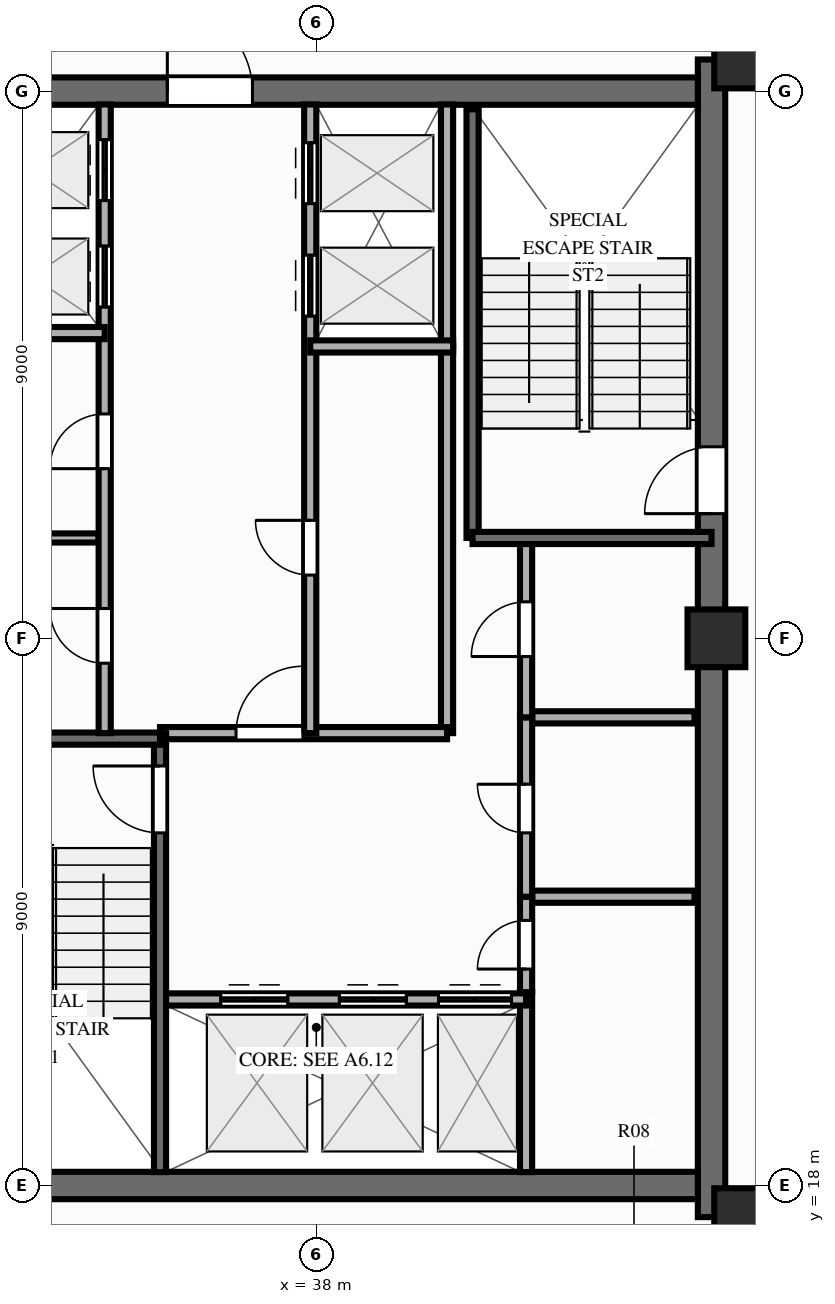
"""IFC4 building model, lengths in metres.
Left out: names, types, materials, properties, quantities, classifications, styles, units other than length and angle.
Written with IfcOpenShell. Run it as: python <this file> out.ifc"""

import sys

from ifc_helpers import new_model, si_unit, direction, frame, frame_2d, origin, origin_2d, place, context, subcontext, project, spatial, rectangle, extrude, source, transform, mapped, element, fill, save


model = new_model("IFC4")
c1 = context("Model", 3, precision=1e-05, world=origin(), true_north=direction((0.0, 1.0)))
c2 = subcontext(c1, "Body", "Model", "MODEL_VIEW")
j1 = project(units=[si_unit("LENGTHUNIT", "METRE"), si_unit("PLANEANGLEUNIT", "RADIAN")], contexts=[c1])
p1 = place(None, origin())
s1 = spatial("IfcSite", under=j1, at=p1, CompositionType="ELEMENT")
p2 = place(p1, origin())
s2 = spatial("IfcBuilding", under=s1, at=p2, CompositionType="ELEMENT")
p3 = place(p2, frame((0.0, 0.0, 236.1)))
s3 = spatial("IfcBuildingStorey", under=s2, at=p3, CompositionType="ELEMENT", Elevation=236.1)
p4 = place(p3, frame((44.5, 17.48, 0.0), z_axis=(0.0, 0.0, 1.0), x_axis=(0.0, 1.0, 0.0)))
e1 = element("IfcWall", 1, at=p4, inside=s3, PredefinedType="SHEAR", context=c2, shape_type="SweptSolid", body=[
    extrude(rectangle(XDim=19.04, YDim=0.45, at=frame_2d((9.52, 0.0))), origin(), (0.0, 0.0, 1.0), 3.9),
])
p5 = place(p4, frame((12.67, 0.0, 0.0), z_axis=(0.0, 0.0, 1.0), x_axis=(-1.0, 0.0, 0.0)))
e2 = element("IfcOpeningElement", 2, at=p5, cuts=e1, PredefinedType="OPENING", context=c2, shape_type="SweptSolid", body=[
    extrude(rectangle(XDim=1.1, YDim=2.15, at=frame_2d((0.55, 1.075))), frame((0.0, 0.237, 0.0), z_axis=(0.0, -1.0, 0.0), x_axis=(1.0, 0.0, 0.0)), (0.0, 0.0, 1.0), 0.474),
])
p6 = place(p3, frame((31.725, 18.0, 0.0), z_axis=(0.0, 0.0, 1.0), x_axis=(1.0, 0.0, 0.0)))
e3 = element("IfcWall", 3, at=p6, inside=s3, PredefinedType="SHEAR", context=c2, shape_type="SweptSolid", body=[
    extrude(rectangle(XDim=12.55, YDim=0.45, at=frame_2d((6.275, 0.0))), origin(), (0.0, 0.0, 1.0), 3.9),
])
p7 = place(p3, frame((31.725, 36.0, 0.0), z_axis=(0.0, 0.0, 1.0), x_axis=(1.0, 0.0, 0.0)))
e4 = element("IfcWall", 4, at=p7, inside=s3, PredefinedType="SHEAR", context=c2, shape_type="SweptSolid", body=[
    extrude(rectangle(XDim=12.55, YDim=0.45, at=frame_2d((6.275, 0.0))), origin(), (0.0, 0.0, 1.0), 3.9),
])
p8 = place(p7, frame((5.225, 0.0, 0.0), z_axis=(0.0, 0.0, 1.0), x_axis=(-1.0, 0.0, 0.0)))
e5 = element("IfcOpeningElement", 5, at=p8, cuts=e4, PredefinedType="OPENING", context=c2, shape_type="SweptSolid", body=[
    extrude(rectangle(XDim=1.4, YDim=2.15, at=frame_2d((0.7, 1.075))), frame((0.0, 0.237, 0.0), z_axis=(0.0, -1.0, 0.0), x_axis=(1.0, 0.0, 0.0)), (0.0, 0.0, 1.0), 0.474),
])
m1 = source(origin(), c2, "Body", "SweptSolid", [
    extrude(rectangle(XDim=0.95, YDim=0.95, at=origin_2d()), origin(), (0.0, 0.0, 1.0), 3.9),
])
for number, where, z_axis, x_axis in (
    (6, (45.02, 17.48, 0.0), (0.0, 0.0, 1.0), (1.0, 0.0, 0.0)),
    (7, (45.02, 36.52, 0.0), (0.0, 0.0, 1.0), (1.0, 0.0, 0.0)),
    (8, (44.58, 27.0, 0.0), (0.0, 0.0, 1.0), (1.0, 0.0, 0.0)),
):
    element("IfcColumn", number, at=place(p3, frame(where, z_axis=z_axis, x_axis=x_axis)), inside=s3, PredefinedType="COLUMN", context=c2, shape_type="MappedRepresentation", body=[
        mapped(m1, transform((0.0, 0.0, 0.0), scale=1.0)),
    ])
p9 = place(p3, frame((32.15, 28.65, 0.0), z_axis=(0.0, 0.0, 1.0), x_axis=(1.0, 0.0, 0.0)))
e9 = element("IfcWall", 9, at=p9, inside=s3, PredefinedType="PARTITIONING", context=c2, shape_type="SweptSolid", body=[
    extrude(rectangle(XDim=2.27, YDim=0.15, at=frame_2d((1.135, 0.0))), origin(), (0.0, 0.0, 1.0), 3.04),
])
p10 = place(p3, frame((41.55, 22.75, 0.0), z_axis=(0.0, 0.0, 1.0), x_axis=(1.0, 0.0, 0.0)))
e10 = element("IfcWall", 10, at=p10, inside=s3, PredefinedType="PARTITIONING", context=c2, shape_type="SweptSolid", body=[
    extrude(rectangle(XDim=2.67, YDim=0.2, at=frame_2d((1.335, 0.0))), origin(), (0.0, 0.0, 1.0), 3.56),
])
p11 = place(p3, frame((41.55, 25.7, 0.0), z_axis=(0.0, 0.0, 1.0), x_axis=(1.0, 0.0, 0.0)))
e11 = element("IfcWall", 11, at=p11, inside=s3, PredefinedType="PARTITIONING", context=c2, shape_type="SweptSolid", body=[
    extrude(rectangle(XDim=2.67, YDim=0.2, at=frame_2d((1.335, 0.0))), origin(), (0.0, 0.0, 1.0), 3.04),
])
p12 = place(p3, frame((41.45, 18.22, 0.0), z_axis=(0.0, 0.0, 1.0), x_axis=(0.0, 1.0, 0.0)))
e12 = element("IfcWall", 12, at=p12, inside=s3, PredefinedType="PARTITIONING", context=c2, shape_type="SweptSolid", body=[
    extrude(rectangle(XDim=2.96, YDim=0.2, at=frame_2d((1.48, 0.0))), origin(), (0.0, 0.0, 1.0), 3.56),
])
p13 = place(p3, frame((41.45, 21.18, 0.0), z_axis=(0.0, 0.0, 1.0), x_axis=(0.0, 1.0, 0.0)))
e13 = element("IfcWall", 13, at=p13, inside=s3, PredefinedType="PARTITIONING", context=c2, shape_type="SweptSolid", body=[
    extrude(rectangle(XDim=1.57, YDim=0.2, at=frame_2d((0.785, 0.0))), origin(), (0.0, 0.0, 1.0), 3.56),
])
p14 = place(p13, frame((0.38, 0.0, 0.0)))
e14 = element("IfcOpeningElement", 14, at=p14, cuts=e13, PredefinedType="OPENING", context=c2, shape_type="SweptSolid", body=[
    extrude(rectangle(XDim=0.8, YDim=2.05, at=frame_2d((0.4, 1.025))), frame((0.0, 0.112, 0.0), z_axis=(0.0, -1.0, 0.0), x_axis=(1.0, 0.0, 0.0)), (0.0, 0.0, 1.0), 0.224),
])
p15 = place(p3, frame((41.45, 22.75, 0.0), z_axis=(0.0, 0.0, 1.0), x_axis=(0.0, 1.0, 0.0)))
e15 = element("IfcWall", 15, at=p15, inside=s3, PredefinedType="PARTITIONING", context=c2, shape_type="SweptSolid", body=[
    extrude(rectangle(XDim=2.95, YDim=0.2, at=frame_2d((1.475, 0.0))), origin(), (0.0, 0.0, 1.0), 3.56),
])
p16 = place(p15, frame((1.05, 0.0, 0.0)))
e16 = element("IfcOpeningElement", 16, at=p16, cuts=e15, PredefinedType="OPENING", context=c2, shape_type="SweptSolid", body=[
    extrude(rectangle(XDim=0.8, YDim=2.05, at=frame_2d((0.4, 1.025))), frame((0.0, 0.112, 0.0), z_axis=(0.0, -1.0, 0.0), x_axis=(1.0, 0.0, 0.0)), (0.0, 0.0, 1.0), 0.224),
])
p17 = place(p3, frame((41.45, 25.7, 0.0), z_axis=(0.0, 0.0, 1.0), x_axis=(0.0, 1.0, 0.0)))
e17 = element("IfcWall", 17, at=p17, inside=s3, PredefinedType="PARTITIONING", context=c2, shape_type="SweptSolid", body=[
    extrude(rectangle(XDim=2.9, YDim=0.2, at=frame_2d((1.45, 0.0))), origin(), (0.0, 0.0, 1.0), 3.56),
])
p18 = place(p17, frame((1.0, 0.0, 0.0)))
e18 = element("IfcOpeningElement", 18, at=p18, cuts=e17, PredefinedType="OPENING", context=c2, shape_type="SweptSolid", body=[
    extrude(rectangle(XDim=0.9, YDim=2.1, at=frame_2d((0.45, 1.05))), frame((0.0, 0.112, 0.0), z_axis=(0.0, -1.0, 0.0), x_axis=(1.0, 0.0, 0.0)), (0.0, 0.0, 1.0), 0.224),
])
p19 = place(p3, frame((40.15, 25.44, 0.0), z_axis=(0.0, 0.0, 1.0), x_axis=(0.0, 1.0, 0.0)))
e19 = element("IfcWall", 19, at=p19, inside=s3, PredefinedType="PARTITIONING", context=c2, shape_type="SweptSolid", body=[
    extrude(rectangle(XDim=6.36, YDim=0.2, at=frame_2d((3.18, 0.0))), origin(), (0.0, 0.0, 1.0), 3.56),
])
p20 = place(p3, frame((40.15, 31.8, 0.0), z_axis=(0.0, 0.0, 1.0), x_axis=(0.0, 1.0, 0.0)))
e20 = element("IfcWall", 20, at=p20, inside=s3, PredefinedType="PARTITIONING", context=c2, shape_type="SweptSolid", body=[
    extrude(rectangle(XDim=3.98, YDim=0.2, at=frame_2d((1.99, 0.0))), origin(), (0.0, 0.0, 1.0), 3.56),
])
p21 = place(p3, frame((35.43, 21.06, 0.0), z_axis=(0.0, 0.0, 1.0), x_axis=(1.0, 0.0, 0.0)))
e21 = element("IfcWall", 21, at=p21, inside=s3, PredefinedType="PARTITIONING", context=c2, shape_type="SweptSolid", body=[
    extrude(rectangle(XDim=6.02, YDim=0.2, at=frame_2d((3.01, 0.0))), origin(), (0.0, 0.0, 1.0), 3.56),
])
p22 = place(p21, frame((1.0, 0.0, 0.0)))
e22 = element("IfcOpeningElement", 22, at=p22, cuts=e21, PredefinedType="OPENING", context=c2, shape_type="SweptSolid", body=[
    extrude(rectangle(XDim=1.1, YDim=2.15, at=frame_2d((0.55, 1.075))), frame((0.0, 0.112, 0.0), z_axis=(0.0, -1.0, 0.0), x_axis=(1.0, 0.0, 0.0)), (0.0, 0.0, 1.0), 0.224),
])
p23 = place(p21, frame((2.95, 0.0, 0.0)))
e23 = element("IfcOpeningElement", 23, at=p23, cuts=e21, PredefinedType="OPENING", context=c2, shape_type="SweptSolid", body=[
    extrude(rectangle(XDim=1.1, YDim=2.15, at=frame_2d((0.55, 1.075))), frame((0.0, 0.112, 0.0), z_axis=(0.0, -1.0, 0.0), x_axis=(1.0, 0.0, 0.0)), (0.0, 0.0, 1.0), 0.224),
])
p24 = place(p21, frame((4.58, 0.0, 0.0)))
e24 = element("IfcOpeningElement", 24, at=p24, cuts=e21, PredefinedType="OPENING", context=c2, shape_type="SweptSolid", body=[
    extrude(rectangle(XDim=1.2, YDim=2.15, at=frame_2d((0.6, 1.075))), frame((0.0, 0.112, 0.0), z_axis=(0.0, -1.0, 0.0), x_axis=(1.0, 0.0, 0.0)), (0.0, 0.0, 1.0), 0.224),
])
p25 = place(p3, frame((35.43, 25.44, 0.0), z_axis=(0.0, 0.0, 1.0), x_axis=(1.0, 0.0, 0.0)))
e25 = element("IfcWall", 25, at=p25, inside=s3, PredefinedType="PARTITIONING", context=c2, shape_type="SweptSolid", body=[
    extrude(rectangle(XDim=4.72, YDim=0.2, at=frame_2d((2.36, 0.0))), origin(), (0.0, 0.0, 1.0), 3.56),
])
p26 = place(p25, frame((1.25, 0.0, 0.0)))
e26 = element("IfcOpeningElement", 26, at=p26, cuts=e25, PredefinedType="OPENING", context=c2, shape_type="SweptSolid", body=[
    extrude(rectangle(XDim=1.1, YDim=2.15, at=frame_2d((0.55, 1.075))), frame((0.0, 0.112, 0.0), z_axis=(0.0, -1.0, 0.0), x_axis=(1.0, 0.0, 0.0)), (0.0, 0.0, 1.0), 0.224),
])
p27 = place(p3, frame((35.43, 18.22, 0.0), z_axis=(0.0, 0.0, 1.0), x_axis=(0.0, 1.0, 0.0)))
e27 = element("IfcWall", 27, at=p27, inside=s3, PredefinedType="SOLIDWALL", context=c2, shape_type="SweptSolid", body=[
    extrude(rectangle(XDim=7.22, YDim=0.2, at=frame_2d((3.61, 0.0))), origin(), (0.0, 0.0, 1.0), 3.69),
])
p28 = place(p27, frame((6.68, 0.0, 0.0), z_axis=(0.0, 0.0, 1.0), x_axis=(-1.0, 0.0, 0.0)))
e28 = element("IfcOpeningElement", 28, at=p28, cuts=e27, PredefinedType="OPENING", context=c2, shape_type="SweptSolid", body=[
    extrude(rectangle(XDim=1.1, YDim=2.15, at=frame_2d((0.55, 1.075))), frame((0.0, 0.112, 0.0), z_axis=(0.0, -1.0, 0.0), x_axis=(1.0, 0.0, 0.0)), (0.0, 0.0, 1.0), 0.224),
])
p29 = place(p3, frame((31.5, 25.35, 0.0), z_axis=(0.0, 0.0, 1.0), x_axis=(1.0, 0.0, 0.0)))
e29 = element("IfcWall", 29, at=p29, inside=s3, PredefinedType="SOLIDWALL", context=c2, shape_type="SweptSolid", body=[
    extrude(rectangle(XDim=3.93, YDim=0.2, at=frame_2d((1.965, 0.0))), origin(), (0.0, 0.0, 1.0), 3.69),
])
p30 = place(p3, frame((40.57, 28.65, 0.0), z_axis=(0.0, 0.0, 1.0), x_axis=(0.0, 1.0, 0.0)))
e30 = element("IfcWall", 30, at=p30, inside=s3, PredefinedType="SOLIDWALL", context=c2, shape_type="SweptSolid", body=[
    extrude(rectangle(XDim=7.05, YDim=0.2, at=frame_2d((3.525, 0.0))), origin(), (0.0, 0.0, 1.0), 3.69),
])
p31 = place(p3, frame((40.57, 28.65, 0.0), z_axis=(0.0, 0.0, 1.0), x_axis=(1.0, 0.0, 0.0)))
e31 = element("IfcWall", 31, at=p31, inside=s3, PredefinedType="SOLIDWALL", context=c2, shape_type="SweptSolid", body=[
    extrude(rectangle(XDim=3.93, YDim=0.2, at=frame_2d((1.965, 0.0))), origin(), (0.0, 0.0, 1.0), 3.69),
])
p32 = place(p3, frame((34.52, 25.44, 0.0), z_axis=(0.0, 0.0, 1.0), x_axis=(0.0, 1.0, 0.0)))
e32 = element("IfcWall", 32, at=p32, inside=s3, PredefinedType="PARTITIONING", context=c2, shape_type="SweptSolid", body=[
    extrude(rectangle(XDim=10.34, YDim=0.2, at=frame_2d((5.17, 0.0))), origin(), (0.0, 0.0, 1.0), 3.56),
])
p33 = place(p32, frame((1.15, 0.0, 0.0)))
e33 = element("IfcOpeningElement", 33, at=p33, cuts=e32, PredefinedType="OPENING", context=c2, shape_type="SweptSolid", body=[
    extrude(rectangle(XDim=0.9, YDim=2.1, at=frame_2d((0.45, 1.05))), frame((0.0, 0.112, 0.0), z_axis=(0.0, -1.0, 0.0), x_axis=(1.0, 0.0, 0.0)), (0.0, 0.0, 1.0), 0.224),
])
p34 = place(p32, frame((4.35, 0.0, 0.0)))
e34 = element("IfcOpeningElement", 34, at=p34, cuts=e32, PredefinedType="OPENING", context=c2, shape_type="SweptSolid", body=[
    extrude(rectangle(XDim=0.9, YDim=2.1, at=frame_2d((0.45, 1.05))), frame((0.0, 0.112, 0.0), z_axis=(0.0, -1.0, 0.0), x_axis=(1.0, 0.0, 0.0)), (0.0, 0.0, 1.0), 0.224),
])
p35 = place(p32, frame((7.01, 0.0, 0.0)))
e35 = element("IfcOpeningElement", 35, at=p35, cuts=e32, PredefinedType="OPENING", context=c2, shape_type="SweptSolid", body=[
    extrude(rectangle(XDim=1.0, YDim=2.15, at=frame_2d((0.5, 1.075))), frame((0.0, 0.112, 0.0), z_axis=(0.0, -1.0, 0.0), x_axis=(1.0, 0.0, 0.0)), (0.0, 0.0, 1.0), 0.224),
])
p36 = place(p32, frame((8.76, 0.0, 0.0)))
e36 = element("IfcOpeningElement", 36, at=p36, cuts=e32, PredefinedType="OPENING", context=c2, shape_type="SweptSolid", body=[
    extrude(rectangle(XDim=1.0, YDim=2.15, at=frame_2d((0.5, 1.075))), frame((0.0, 0.112, 0.0), z_axis=(0.0, -1.0, 0.0), x_axis=(1.0, 0.0, 0.0)), (0.0, 0.0, 1.0), 0.224),
])
p37 = place(p3, frame((31.72, 32.02, 0.0), z_axis=(0.0, 0.0, 1.0), x_axis=(1.0, 0.0, 0.0)))
e37 = element("IfcWall", 37, at=p37, inside=s3, PredefinedType="PARTITIONING", context=c2, shape_type="SweptSolid", body=[
    extrude(rectangle(XDim=2.8, YDim=0.2, at=frame_2d((1.4, 0.0))), origin(), (0.0, 0.0, 1.0), 3.56),
])
p38 = place(p3, frame((37.9, 25.44, 0.0), z_axis=(0.0, 0.0, 1.0), x_axis=(0.0, 1.0, 0.0)))
e38 = element("IfcWall", 38, at=p38, inside=s3, PredefinedType="PARTITIONING", context=c2, shape_type="SweptSolid", body=[
    extrude(rectangle(XDim=10.34, YDim=0.2, at=frame_2d((5.17, 0.0))), origin(), (0.0, 0.0, 1.0), 3.56),
])
p39 = place(p38, frame((2.6, 0.0, 0.0)))
e39 = element("IfcOpeningElement", 39, at=p39, cuts=e38, PredefinedType="OPENING", context=c2, shape_type="SweptSolid", body=[
    extrude(rectangle(XDim=0.9, YDim=2.1, at=frame_2d((0.45, 1.05))), frame((0.0, 0.112, 0.0), z_axis=(0.0, -1.0, 0.0), x_axis=(1.0, 0.0, 0.0)), (0.0, 0.0, 1.0), 0.224),
])
p40 = place(p38, frame((6.86, 0.0, 0.0)))
e40 = element("IfcOpeningElement", 40, at=p40, cuts=e38, PredefinedType="OPENING", context=c2, shape_type="SweptSolid", body=[
    extrude(rectangle(XDim=1.0, YDim=2.15, at=frame_2d((0.5, 1.075))), frame((0.0, 0.112, 0.0), z_axis=(0.0, -1.0, 0.0), x_axis=(1.0, 0.0, 0.0)), (0.0, 0.0, 1.0), 0.224),
])
p41 = place(p38, frame((8.71, 0.0, 0.0)))
e41 = element("IfcOpeningElement", 41, at=p41, cuts=e38, PredefinedType="OPENING", context=c2, shape_type="SweptSolid", body=[
    extrude(rectangle(XDim=1.0, YDim=2.15, at=frame_2d((0.5, 1.075))), frame((0.0, 0.112, 0.0), z_axis=(0.0, -1.0, 0.0), x_axis=(1.0, 0.0, 0.0)), (0.0, 0.0, 1.0), 0.224),
])
p42 = place(p3, frame((37.9, 31.8, 0.0), z_axis=(0.0, 0.0, 1.0), x_axis=(1.0, 0.0, 0.0)))
e42 = element("IfcWall", 42, at=p42, inside=s3, PredefinedType="PARTITIONING", context=c2, shape_type="SweptSolid", body=[
    extrude(rectangle(XDim=2.35, YDim=0.2, at=frame_2d((1.175, 0.0))), origin(), (0.0, 0.0, 1.0), 3.56),
])
m2 = source(origin(), c2, "Body", "SweptSolid", [
    extrude(rectangle(XDim=1.1, YDim=2.15, at=frame_2d((0.55, 1.075))), frame((0.0, 0.025, 0.0), z_axis=(0.0, -1.0, 0.0), x_axis=(1.0, 0.0, 0.0)), (0.0, 0.0, 1.0), 0.05),
])
p43 = place(p5, origin())
e43 = element("IfcDoor", 43, at=p43, inside=s3, OperationType="SINGLE_SWING_RIGHT", PredefinedType="DOOR", context=c2, shape_type="MappedRepresentation", body=[
    mapped(m2, transform((0.0, 0.0, 0.0), scale=1.0)),
])
fill(e2, e43)
m3 = source(origin(), c2, "Body", "SweptSolid", [
    extrude(rectangle(XDim=1.4, YDim=2.15, at=frame_2d((0.7, 1.075))), frame((0.0, 0.025, 0.0), z_axis=(0.0, -1.0, 0.0), x_axis=(1.0, 0.0, 0.0)), (0.0, 0.0, 1.0), 0.05),
])
p44 = place(p8, origin())
e44 = element("IfcDoor", 44, at=p44, inside=s3, OperationType="SINGLE_SWING_RIGHT", PredefinedType="DOOR", context=c2, shape_type="MappedRepresentation", body=[
    mapped(m3, transform((0.0, 0.0, 0.0), scale=1.0)),
])
fill(e5, e44)
m4 = source(origin(), c2, "Body", "SweptSolid", [
    extrude(rectangle(XDim=0.8, YDim=2.05, at=frame_2d((0.4, 1.025))), frame((0.0, 0.025, 0.0), z_axis=(0.0, -1.0, 0.0), x_axis=(1.0, 0.0, 0.0)), (0.0, 0.0, 1.0), 0.05),
])
p45 = place(p14, origin())
e45 = element("IfcDoor", 45, at=p45, inside=s3, OperationType="SINGLE_SWING_LEFT", PredefinedType="DOOR", context=c2, shape_type="MappedRepresentation", body=[
    mapped(m4, transform((0.0, 0.0, 0.0), scale=1.0)),
])
fill(e14, e45)
p46 = place(p16, origin())
e46 = element("IfcDoor", 46, at=p46, inside=s3, OperationType="SINGLE_SWING_RIGHT", PredefinedType="DOOR", context=c2, shape_type="MappedRepresentation", body=[
    mapped(m4, transform((0.0, 0.0, 0.0), scale=1.0)),
])
fill(e16, e46)
m5 = source(origin(), c2, "Body", "SweptSolid", [
    extrude(rectangle(XDim=0.9, YDim=2.1, at=frame_2d((0.45, 1.05))), frame((0.0, 0.025, 0.0), z_axis=(0.0, -1.0, 0.0), x_axis=(1.0, 0.0, 0.0)), (0.0, 0.0, 1.0), 0.05),
])
p47 = place(p18, origin())
e47 = element("IfcDoor", 47, at=p47, inside=s3, OperationType="SINGLE_SWING_LEFT", PredefinedType="DOOR", context=c2, shape_type="MappedRepresentation", body=[
    mapped(m5, transform((0.0, 0.0, 0.0), scale=1.0)),
])
fill(e18, e47)
p48 = place(p22, origin())
e48 = element("IfcDoor", 48, at=p48, inside=s3, OperationType="DOUBLE_DOOR_SLIDING", PredefinedType="DOOR", context=c2, shape_type="MappedRepresentation", body=[
    mapped(m2, transform((0.0, 0.0, 0.0), scale=1.0)),
])
fill(e22, e48)
p49 = place(p23, origin())
e49 = element("IfcDoor", 49, at=p49, inside=s3, OperationType="DOUBLE_DOOR_SLIDING", PredefinedType="DOOR", context=c2, shape_type="MappedRepresentation", body=[
    mapped(m2, transform((0.0, 0.0, 0.0), scale=1.0)),
])
fill(e23, e49)
m6 = source(origin(), c2, "Body", "SweptSolid", [
    extrude(rectangle(XDim=1.2, YDim=2.15, at=frame_2d((0.6, 1.075))), frame((0.0, 0.025, 0.0), z_axis=(0.0, -1.0, 0.0), x_axis=(1.0, 0.0, 0.0)), (0.0, 0.0, 1.0), 0.05),
])
p50 = place(p24, origin())
e50 = element("IfcDoor", 50, at=p50, inside=s3, OperationType="DOUBLE_DOOR_SLIDING", PredefinedType="DOOR", context=c2, shape_type="MappedRepresentation", body=[
    mapped(m6, transform((0.0, 0.0, 0.0), scale=1.0)),
])
fill(e24, e50)
p51 = place(p26, origin())
e51 = element("IfcDoor", 51, at=p51, inside=s3, OperationType="SINGLE_SWING_RIGHT", PredefinedType="DOOR", context=c2, shape_type="MappedRepresentation", body=[
    mapped(m2, transform((0.0, 0.0, 0.0), scale=1.0)),
])
fill(e26, e51)
p52 = place(p28, origin())
e52 = element("IfcDoor", 52, at=p52, inside=s3, OperationType="SINGLE_SWING_LEFT", PredefinedType="DOOR", context=c2, shape_type="MappedRepresentation", body=[
    mapped(m2, transform((0.0, 0.0, 0.0), scale=1.0)),
])
fill(e28, e52)
p53 = place(p33, origin())
e53 = element("IfcDoor", 53, at=p53, inside=s3, OperationType="SINGLE_SWING_RIGHT", PredefinedType="DOOR", context=c2, shape_type="MappedRepresentation", body=[
    mapped(m5, transform((0.0, 0.0, 0.0), scale=1.0)),
])
fill(e33, e53)
p54 = place(p34, origin())
e54 = element("IfcDoor", 54, at=p54, inside=s3, OperationType="SINGLE_SWING_LEFT", PredefinedType="DOOR", context=c2, shape_type="MappedRepresentation", body=[
    mapped(m5, transform((0.0, 0.0, 0.0), scale=1.0)),
])
fill(e34, e54)
m7 = source(origin(), c2, "Body", "SweptSolid", [
    extrude(rectangle(XDim=1.0, YDim=2.15, at=frame_2d((0.5, 1.075))), frame((0.0, 0.025, 0.0), z_axis=(0.0, -1.0, 0.0), x_axis=(1.0, 0.0, 0.0)), (0.0, 0.0, 1.0), 0.05),
])
p55 = place(p35, origin())
e55 = element("IfcDoor", 55, at=p55, inside=s3, OperationType="DOUBLE_DOOR_SLIDING", PredefinedType="DOOR", context=c2, shape_type="MappedRepresentation", body=[
    mapped(m7, transform((0.0, 0.0, 0.0), scale=1.0)),
])
fill(e35, e55)
p56 = place(p36, origin())
e56 = element("IfcDoor", 56, at=p56, inside=s3, OperationType="DOUBLE_DOOR_SLIDING", PredefinedType="DOOR", context=c2, shape_type="MappedRepresentation", body=[
    mapped(m7, transform((0.0, 0.0, 0.0), scale=1.0)),
])
fill(e36, e56)
p57 = place(p39, origin())
e57 = element("IfcDoor", 57, at=p57, inside=s3, OperationType="SINGLE_SWING_RIGHT", PredefinedType="DOOR", context=c2, shape_type="MappedRepresentation", body=[
    mapped(m5, transform((0.0, 0.0, 0.0), scale=1.0)),
])
fill(e39, e57)
p58 = place(p40, origin())
e58 = element("IfcDoor", 58, at=p58, inside=s3, OperationType="DOUBLE_DOOR_SLIDING", PredefinedType="DOOR", context=c2, shape_type="MappedRepresentation", body=[
    mapped(m7, transform((0.0, 0.0, 0.0), scale=1.0)),
])
fill(e40, e58)
p59 = place(p41, origin())
e59 = element("IfcDoor", 59, at=p59, inside=s3, OperationType="DOUBLE_DOOR_SLIDING", PredefinedType="DOOR", context=c2, shape_type="MappedRepresentation", body=[
    mapped(m7, transform((0.0, 0.0, 0.0), scale=1.0)),
])
fill(e41, e59)
save(model, sys.argv[1])
